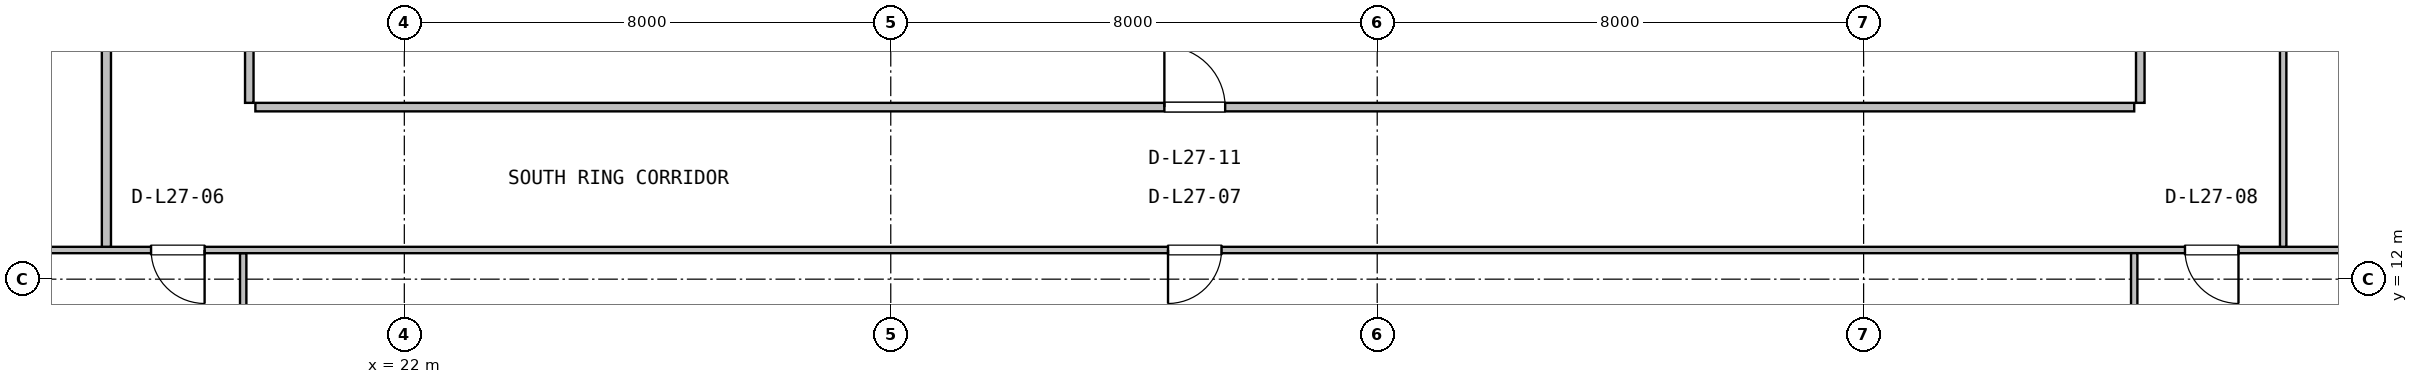
"""IFC4 building model, lengths in metres.
Left out: names, types, materials, properties, quantities, classifications, styles, units other than length and angle.
Written with IfcOpenShell. Run it as: python <this file> out.ifc"""

import sys

from ifc_helpers import new_model, si_unit, direction, frame, frame_2d, origin, place, context, subcontext, project, spatial, rectangle, extrude, source, transform, mapped, element, fill, save


model = new_model("IFC4")
c1 = context("Model", 3, precision=1e-05, world=origin(), true_north=direction((0.0, 1.0)))
c2 = subcontext(c1, "Body", "Model", "MODEL_VIEW")
j1 = project(units=[si_unit("LENGTHUNIT", "METRE"), si_unit("PLANEANGLEUNIT", "RADIAN")], contexts=[c1])
p1 = place(None, origin())
s1 = spatial("IfcSite", under=j1, at=p1, CompositionType="ELEMENT")
p2 = place(p1, origin())
s2 = spatial("IfcBuilding", under=s1, at=p2, CompositionType="ELEMENT")
p3 = place(p2, frame((0.0, 0.0, 114.4)))
s3 = spatial("IfcBuildingStorey", under=s2, at=p3, CompositionType="ELEMENT", Elevation=114.4)
p4 = place(p3, frame((19.35, 5.55, 0.0), z_axis=(0.0, 0.0, 1.0), x_axis=(0.0, 1.0, 0.0)))
e1 = element("IfcWall", 1, at=p4, inside=s3, PredefinedType="PARTITIONING", context=c2, shape_type="SweptSolid", body=[
    extrude(rectangle(XDim=6.878, YDim=0.105, at=frame_2d((3.439, 0.0))), origin(), (0.0, 0.0, 1.0), 3.222),
])
p5 = place(p3, frame((4.68, 12.48, 0.0), z_axis=(0.0, 0.0, 1.0), x_axis=(1.0, 0.0, 0.0)))
e2 = element("IfcWall", 2, at=p5, inside=s3, PredefinedType="PARTITIONING", context=c2, shape_type="SweptSolid", body=[
    extrude(rectangle(XDim=58.64, YDim=0.105, at=frame_2d((29.32, 0.0))), origin(), (0.0, 0.0, 1.0), 2.83),
])
p6 = place(p5, frame((13.155, 0.0, 0.0)))
e3 = element("IfcOpeningElement", 3, at=p6, cuts=e2, PredefinedType="OPENING", context=c2, shape_type="SweptSolid", body=[
    extrude(rectangle(XDim=0.88, YDim=2.06, at=frame_2d((0.44, 1.03))), frame((0.0, 0.062, 0.0), z_axis=(0.0, -1.0, 0.0), x_axis=(1.0, 0.0, 0.0)), (0.0, 0.0, 1.0), 0.125),
])
p7 = place(p5, frame((29.88, 0.0, 0.0)))
e4 = element("IfcOpeningElement", 4, at=p7, cuts=e2, PredefinedType="OPENING", context=c2, shape_type="SweptSolid", body=[
    extrude(rectangle(XDim=0.88, YDim=2.06, at=frame_2d((0.44, 1.03))), frame((0.0, 0.062, 0.0), z_axis=(0.0, -1.0, 0.0), x_axis=(1.0, 0.0, 0.0)), (0.0, 0.0, 1.0), 0.125),
])
p8 = place(p5, frame((46.605, 0.0, 0.0)))
e5 = element("IfcOpeningElement", 5, at=p8, cuts=e2, PredefinedType="OPENING", context=c2, shape_type="SweptSolid", body=[
    extrude(rectangle(XDim=0.88, YDim=2.06, at=frame_2d((0.44, 1.03))), frame((0.0, 0.062, 0.0), z_axis=(0.0, -1.0, 0.0), x_axis=(1.0, 0.0, 0.0)), (0.0, 0.0, 1.0), 0.125),
])
p9 = place(p3, frame((50.45, 4.38, 0.0), z_axis=(0.0, 0.0, 1.0), x_axis=(0.0, 1.0, 0.0)))
e6 = element("IfcWall", 6, at=p9, inside=s3, PredefinedType="PARTITIONING", context=c2, shape_type="SweptSolid", body=[
    extrude(rectangle(XDim=8.048, YDim=0.105, at=frame_2d((4.024, 0.0))), origin(), (0.0, 0.0, 1.0), 3.108),
])
p10 = place(p3, frame((17.1, 12.533, 0.0), z_axis=(0.0, 0.0, 1.0), x_axis=(0.0, 1.0, 0.0)))
e7 = element("IfcWall", 7, at=p10, inside=s3, PredefinedType="PARTITIONING", context=c2, shape_type="SweptSolid", body=[
    extrude(rectangle(XDim=20.73, YDim=0.15, at=frame_2d((10.365, 0.0))), origin(), (0.0, 0.0, 1.0), 3.222),
])
p11 = place(p10, frame((5.427, 0.0, 0.0)))
e8 = element("IfcOpeningElement", 8, at=p11, cuts=e7, PredefinedType="OPENING", context=c2, shape_type="SweptSolid", body=[
    extrude(rectangle(XDim=0.92, YDim=2.08, at=frame_2d((0.46, 1.04))), frame((0.0, 0.085, 0.0), z_axis=(0.0, -1.0, 0.0), x_axis=(1.0, 0.0, 0.0)), (0.0, 0.0, 1.0), 0.17),
])
p12 = place(p10, frame((15.797, 0.0, 0.0)))
e9 = element("IfcOpeningElement", 9, at=p12, cuts=e7, PredefinedType="OPENING", context=c2, shape_type="SweptSolid", body=[
    extrude(rectangle(XDim=1.05, YDim=2.1, at=frame_2d((0.525, 1.05))), frame((0.0, 0.085, 0.0), z_axis=(0.0, -1.0, 0.0), x_axis=(1.0, 0.0, 0.0)), (0.0, 0.0, 1.0), 0.17),
])
p13 = place(p3, frame((19.55, 14.83, 0.0), z_axis=(0.0, 0.0, 1.0), x_axis=(1.0, 0.0, 0.0)))
e10 = element("IfcWall", 10, at=p13, inside=s3, PredefinedType="PARTITIONING", context=c2, shape_type="SweptSolid", body=[
    extrude(rectangle(XDim=30.9, YDim=0.14, at=frame_2d((15.45, 0.0))), origin(), (0.0, 0.0, 1.0), 2.83),
])
p14 = place(p13, frame((14.95, 0.0, 0.0)))
e11 = element("IfcOpeningElement", 11, at=p14, cuts=e10, PredefinedType="OPENING", context=c2, shape_type="SweptSolid", body=[
    extrude(rectangle(XDim=1.0, YDim=2.1, at=frame_2d((0.5, 1.05))), frame((0.0, 0.08, 0.0), z_axis=(0.0, -1.0, 0.0), x_axis=(1.0, 0.0, 0.0)), (0.0, 0.0, 1.0), 0.16),
])
for number, where, z_axis, x_axis in (
    (12, (50.55, 14.9, 0.0), (0.0, 0.0, 1.0), (0.0, 1.0, 0.0)),
    (13, (19.45, 14.9, 0.0), (0.0, 0.0, 1.0), (0.0, 1.0, 0.0)),
):
    element("IfcWall", number, at=place(p3, frame(where, z_axis=z_axis, x_axis=x_axis)), inside=s3, PredefinedType="PARTITIONING", context=c2, shape_type="SweptSolid", body=[
        extrude(rectangle(XDim=18.375, YDim=0.14, at=frame_2d((9.188, 0.0))), origin(), (0.0, 0.0, 1.0), 3.222),
    ])
p15 = place(p3, frame((52.9, 12.533, 0.0), z_axis=(0.0, 0.0, 1.0), x_axis=(0.0, 1.0, 0.0)))
e14 = element("IfcWall", 14, at=p15, inside=s3, PredefinedType="PARTITIONING", context=c2, shape_type="SweptSolid", body=[
    extrude(rectangle(XDim=20.764, YDim=0.105, at=frame_2d((10.382, 0.0))), origin(), (0.0, 0.0, 1.0), 3.222),
])
p16 = place(p15, frame((9.942, 0.0, 0.0)))
e15 = element("IfcOpeningElement", 15, at=p16, cuts=e14, PredefinedType="OPENING", context=c2, shape_type="SweptSolid", body=[
    extrude(rectangle(XDim=0.88, YDim=2.06, at=frame_2d((0.44, 1.03))), frame((0.0, 0.062, 0.0), z_axis=(0.0, -1.0, 0.0), x_axis=(1.0, 0.0, 0.0)), (0.0, 0.0, 1.0), 0.125),
])
m1 = source(origin(), c2, "Body", "SweptSolid", [
    extrude(rectangle(XDim=0.88, YDim=2.06, at=frame_2d((0.44, 1.03))), frame((0.0, 0.025, 0.0), z_axis=(0.0, -1.0, 0.0), x_axis=(1.0, 0.0, 0.0)), (0.0, 0.0, 1.0), 0.05),
])
p17 = place(p6, frame((0.88, 0.0, 0.0), z_axis=(0.0, 0.0, 1.0), x_axis=(-1.0, 0.0, 0.0)))
e16 = element("IfcDoor", 16, at=p17, inside=s3, OperationType="SINGLE_SWING_RIGHT", PredefinedType="DOOR", context=c2, shape_type="MappedRepresentation", body=[
    mapped(m1, transform((0.0, 0.0, 0.0), x_axis=(1.0, 0.0, 0.0), y_axis=(0.0, 1.0, 0.0), z_axis=(0.0, 0.0, 1.0), scale=1.0)),
])
fill(e3, e16)
p18 = place(p7, frame((0.88, 0.0, 0.0), z_axis=(0.0, 0.0, 1.0), x_axis=(-1.0, 0.0, 0.0)))
e17 = element("IfcDoor", 17, at=p18, inside=s3, OperationType="SINGLE_SWING_LEFT", PredefinedType="DOOR", context=c2, shape_type="MappedRepresentation", body=[
    mapped(m1, transform((0.0, 0.0, 0.0), x_axis=(1.0, 0.0, 0.0), y_axis=(0.0, 1.0, 0.0), z_axis=(0.0, 0.0, 1.0), scale=1.0)),
])
fill(e4, e17)
p19 = place(p8, frame((0.88, 0.0, 0.0), z_axis=(0.0, 0.0, 1.0), x_axis=(-1.0, 0.0, 0.0)))
e18 = element("IfcDoor", 18, at=p19, inside=s3, OperationType="SINGLE_SWING_RIGHT", PredefinedType="DOOR", context=c2, shape_type="MappedRepresentation", body=[
    mapped(m1, transform((0.0, 0.0, 0.0), x_axis=(1.0, 0.0, 0.0), y_axis=(0.0, 1.0, 0.0), z_axis=(0.0, 0.0, 1.0), scale=1.0)),
])
fill(e5, e18)
m2 = source(origin(), c2, "Body", "SweptSolid", [
    extrude(rectangle(XDim=1.0, YDim=2.1, at=frame_2d((0.5, 1.05))), frame((0.0, 0.025, 0.0), z_axis=(0.0, -1.0, 0.0), x_axis=(1.0, 0.0, 0.0)), (0.0, 0.0, 1.0), 0.05),
])
p20 = place(p14, origin())
e19 = element("IfcDoor", 19, at=p20, inside=s3, OperationType="SINGLE_SWING_LEFT", PredefinedType="DOOR", context=c2, shape_type="MappedRepresentation", body=[
    mapped(m2, transform((0.0, 0.0, 0.0), x_axis=(1.0, 0.0, 0.0), y_axis=(0.0, 1.0, 0.0), z_axis=(0.0, 0.0, 1.0), scale=1.0)),
])
fill(e11, e19)
save(model, sys.argv[1])
